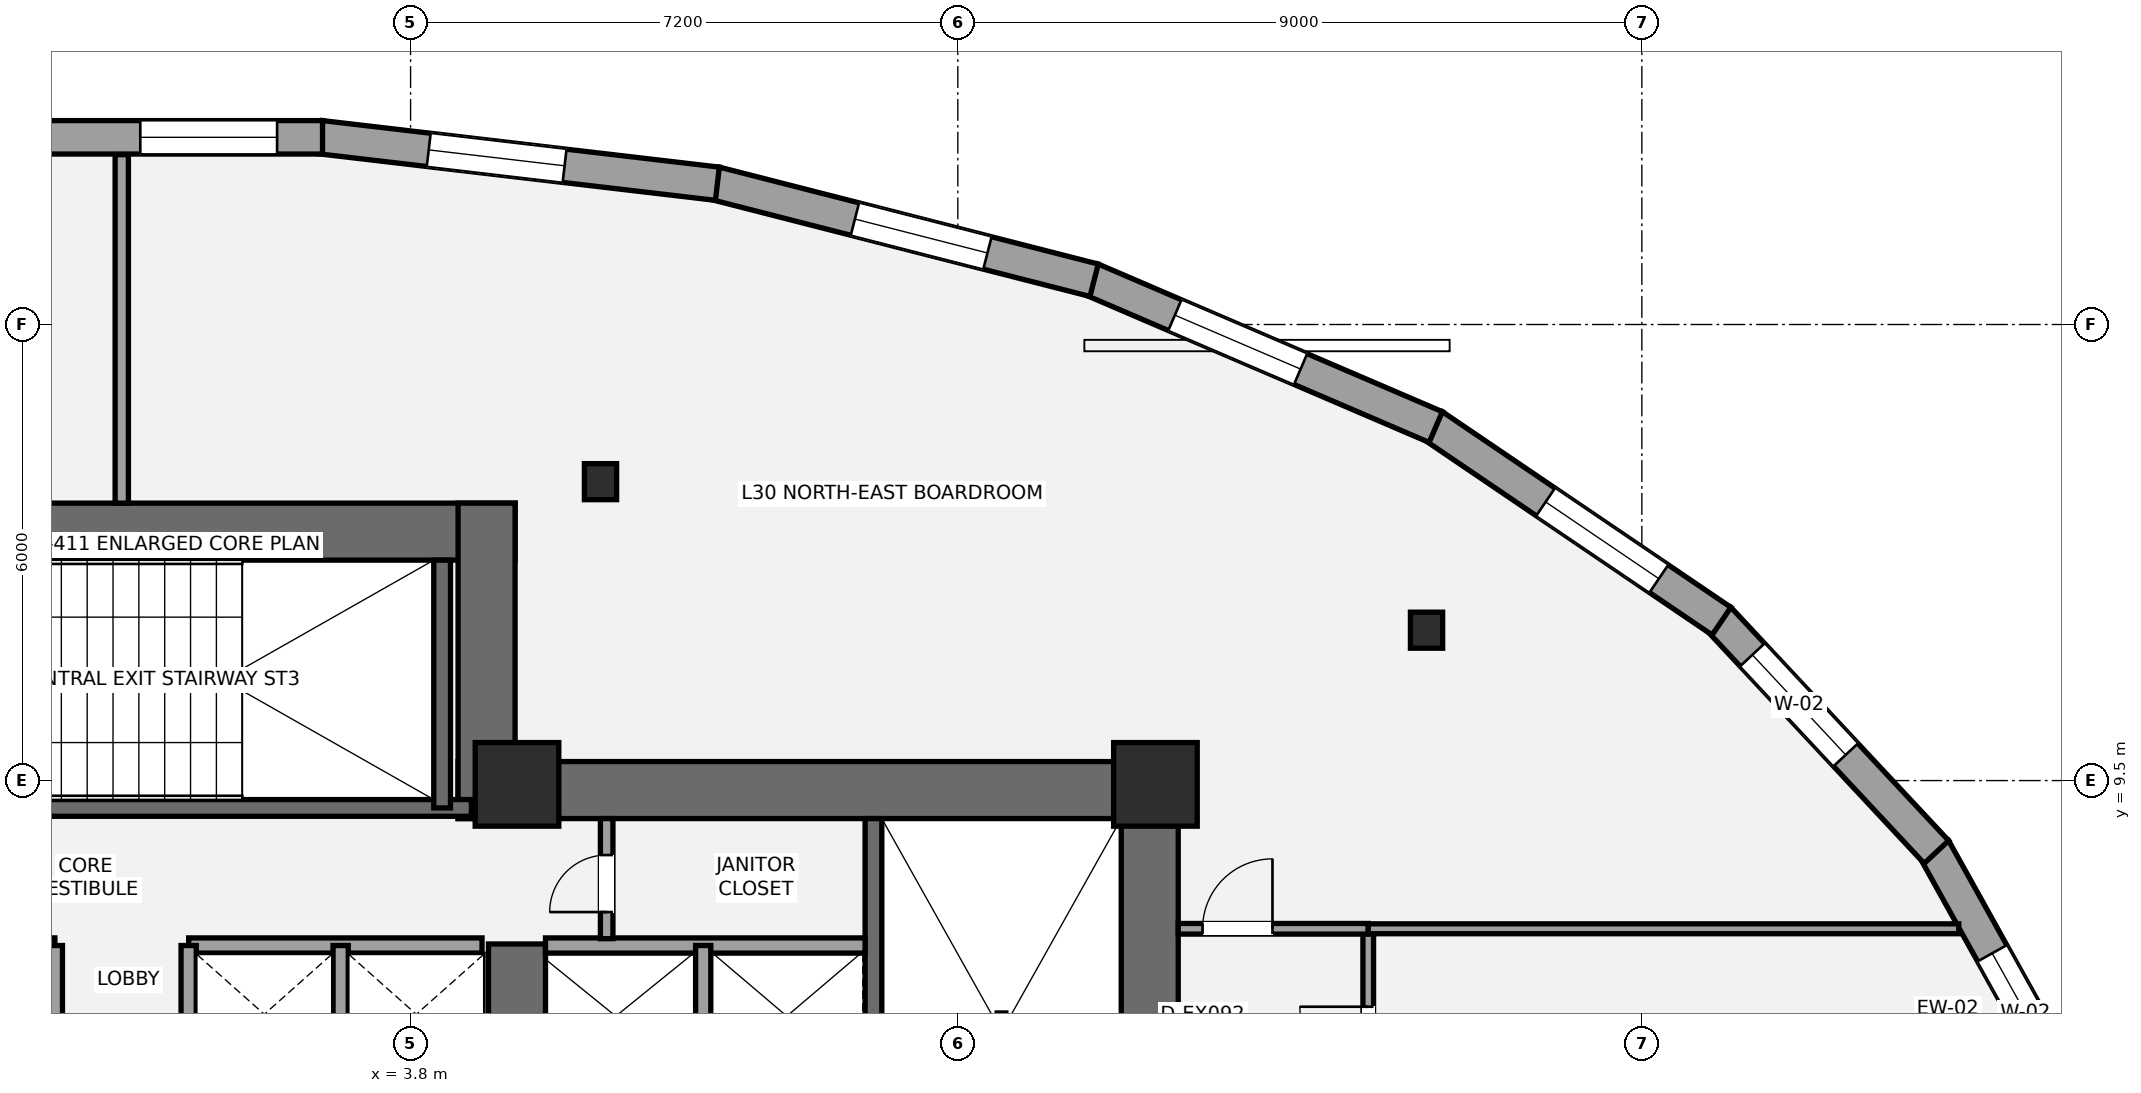
"""IFC4 building model, lengths in metres.
Left out: names, types, materials, properties, quantities, classifications, styles, units other than length and angle.
Written with IfcOpenShell. Run it as: python <this file> out.ifc"""

import sys

from ifc_helpers import new_model, si_unit, direction, frame, frame_2d, origin, origin_2d, place, context, subcontext, project, spatial, rectangle, i_section, extrude, element, fill, save


model = new_model("IFC4")
c1 = context("Model", 3, precision=1e-05, world=origin(), true_north=direction((0.0, 1.0)))
c2 = subcontext(c1, "Body", "Model", "MODEL_VIEW")
j1 = project(units=[si_unit("LENGTHUNIT", "METRE"), si_unit("PLANEANGLEUNIT", "RADIAN")], contexts=[c1])
p1 = place(None, origin())
s1 = spatial("IfcSite", under=j1, at=p1, CompositionType="ELEMENT")
p2 = place(p1, origin())
s2 = spatial("IfcBuilding", under=s1, at=p2, CompositionType="ELEMENT")
p3 = place(p2, frame((0.0, 0.0, 114.1)))
s3 = spatial("IfcBuildingStorey", under=s2, at=p3, CompositionType="ELEMENT", Elevation=114.1)
p4 = place(p3, frame((13.525, 1.1, 0.0), z_axis=(0.0, 0.0, 1.0), x_axis=(0.0, 1.0, 0.0)))
e1 = element("IfcWall", 1, at=p4, inside=s3, PredefinedType="SHEAR", context=c2, shape_type="SweptSolid", body=[
    extrude(rectangle(XDim=8.65, YDim=0.75, at=frame_2d((4.325, 0.0))), origin(), (0.0, 0.0, 1.0), 3.5),
])
p5 = place(p3, frame((4.425, 9.375, 0.0), z_axis=(0.0, 0.0, 1.0), x_axis=(1.0, 0.0, 0.0)))
e2 = element("IfcWall", 2, at=p5, inside=s3, PredefinedType="SHEAR", context=c2, shape_type="SweptSolid", body=[
    extrude(rectangle(XDim=9.475, YDim=0.75, at=frame_2d((4.737, 0.0))), origin(), (0.0, 0.0, 1.0), 3.5),
])
p6 = place(p3, frame((5.2, 5.35, 0.0), z_axis=(0.0, 0.0, 1.0), x_axis=(0.0, 1.0, 0.0)))
e3 = element("IfcWall", 3, at=p6, inside=s3, PredefinedType="SHEAR", context=c2, shape_type="SweptSolid", body=[
    extrude(rectangle(XDim=2.0, YDim=0.75, at=frame_2d((1.0, 0.0))), origin(), (0.0, 0.0, 1.0), 3.5),
])
p7 = place(p3, frame((9.89, 1.85, 0.0), z_axis=(0.0, 0.0, 1.0), x_axis=(0.0, 1.0, 0.0)))
e4 = element("IfcWall", 4, at=p7, inside=s3, PredefinedType="SHEAR", context=c2, shape_type="SweptSolid", body=[
    extrude(rectangle(XDim=7.15, YDim=0.22, at=frame_2d((3.575, 0.0))), origin(), (0.0, 0.0, 1.0), 3.5),
])
p8 = place(p3, frame((-5.175, 12.775, 0.0), z_axis=(0.0, 0.0, 1.0), x_axis=(1.0, 0.0, 0.0)))
e5 = element("IfcWall", 5, at=p8, inside=s3, PredefinedType="SHEAR", context=c2, shape_type="SweptSolid", body=[
    extrude(rectangle(XDim=10.35, YDim=0.75, at=frame_2d((5.175, 0.0))), origin(), (0.0, 0.0, 1.0), 3.5),
])
p9 = place(p3, frame((4.8, 9.0, 0.0), z_axis=(0.0, 0.0, 1.0), x_axis=(0.0, 1.0, 0.0)))
e6 = element("IfcWall", 6, at=p9, inside=s3, PredefinedType="SHEAR", context=c2, shape_type="SweptSolid", body=[
    extrude(rectangle(XDim=4.15, YDim=0.75, at=frame_2d((2.075, 0.0))), origin(), (0.0, 0.0, 1.0), 3.5),
])
p10 = place(p3, frame((-4.7, 9.14, 0.0), z_axis=(0.0, 0.0, 1.0), x_axis=(1.0, 0.0, 0.0)))
e7 = element("IfcWall", 7, at=p10, inside=s3, PredefinedType="SHEAR", context=c2, shape_type="SweptSolid", body=[
    extrude(rectangle(XDim=9.3, YDim=0.22, at=frame_2d((4.65, 0.0))), origin(), (0.0, 0.0, 1.0), 3.5),
])
p11 = place(p10, frame((1.15, 0.0, 0.0)))
e8 = element("IfcOpeningElement", 8, at=p11, cuts=e7, PredefinedType="OPENING", context=c2, shape_type="SweptSolid", body=[
    extrude(rectangle(XDim=1.05, YDim=2.15, at=frame_2d((0.525, 1.075))), frame((0.0, 0.12, 0.0), z_axis=(0.0, -1.0, 0.0), x_axis=(1.0, 0.0, 0.0)), (0.0, 0.0, 1.0), 0.24),
])
p12 = place(p3, frame((4.215, 9.14, 0.0), z_axis=(0.0, 0.0, 1.0), x_axis=(0.0, 1.0, 0.0)))
e9 = element("IfcWall", 9, at=p12, inside=s3, PredefinedType="SHEAR", context=c2, shape_type="SweptSolid", body=[
    extrude(rectangle(XDim=3.26, YDim=0.22, at=frame_2d((1.63, 0.0))), origin(), (0.0, 0.0, 1.0), 3.5),
])
for number, where, z_axis, x_axis in (
    (10, (5.2, 9.45, 0.0), (0.0, 0.0, 1.0), (1.0, 0.0, 0.0)),
    (11, (13.6, 9.45, 0.0), (0.0, 0.0, 1.0), (1.0, 0.0, 0.0)),
):
    element("IfcColumn", number, at=place(p3, frame(where, z_axis=z_axis, x_axis=x_axis)), inside=s3, PredefinedType="COLUMN", context=c2, shape_type="SweptSolid", body=[
        extrude(rectangle(XDim=1.1, YDim=1.1, at=origin_2d()), origin(), (0.0, 0.0, 1.0), 3.5),
    ])
for number, where, z_axis, x_axis in (
    (12, (17.167, 11.478, 0.0), (0.0, 0.0, 1.0), (1.0, 0.0, 0.0)),
    (13, (6.299, 13.433, 0.0), (0.0, 0.0, 1.0), (1.0, 0.0, 0.0)),
):
    element("IfcColumn", number, at=place(p3, frame(where, z_axis=z_axis, x_axis=x_axis)), inside=s3, PredefinedType="COLUMN", context=c2, shape_type="SweptSolid", body=[
        extrude(i_section(OverallWidth=0.424, OverallDepth=0.474, WebThickness=0.048, FlangeThickness=0.077, at=origin_2d()), origin(), (0.0, 0.0, 1.0), 3.5),
    ])
p13 = place(p3, frame((23.844, 8.603, 0.0), z_axis=(0.0, 0.0, 1.0), x_axis=(0.486285838125, -0.873799796086, 0.0)))
e14 = element("IfcWall", 14, at=p13, inside=s3, PredefinedType="STANDARD", context=c2, shape_type="SweptSolid", body=[
    extrude(rectangle(XDim=3.868, YDim=0.44, at=frame_2d((1.934, 0.0))), origin(), (0.0, 0.0, 1.0), 2.528),
])
p14 = place(p13, frame((1.574, 0.0, 0.65)))
e15 = element("IfcOpeningElement", 15, at=p14, cuts=e14, PredefinedType="OPENING", context=c2, shape_type="SweptSolid", body=[
    extrude(rectangle(XDim=1.8, YDim=1.7, at=frame_2d((0.9, 0.85))), frame((0.0, 0.23, 0.0), z_axis=(0.0, -1.0, 0.0), x_axis=(1.0, 0.0, 0.0)), (0.0, 0.0, 1.0), 0.46),
])
p15 = place(p3, frame((21.01, 11.629, 0.0), z_axis=(0.0, 0.0, 1.0), x_axis=(0.682353469166, -0.73102239577, 0.0)))
e16 = element("IfcWall", 16, at=p15, inside=s3, PredefinedType="STANDARD", context=c2, shape_type="SweptSolid", body=[
    extrude(rectangle(XDim=4.199, YDim=0.44, at=frame_2d((2.099, 0.0))), origin(), (0.0, 0.0, 1.0), 2.528),
])
p16 = place(p15, frame((0.65, 0.0, 0.65)))
e17 = element("IfcOpeningElement", 17, at=p16, cuts=e16, PredefinedType="OPENING", context=c2, shape_type="SweptSolid", body=[
    extrude(rectangle(XDim=1.8, YDim=1.7, at=frame_2d((0.9, 0.85))), frame((0.0, 0.23, 0.0), z_axis=(0.0, -1.0, 0.0), x_axis=(1.0, 0.0, 0.0)), (0.0, 0.0, 1.0), 0.46),
])
p17 = place(p3, frame((17.251, 14.171, 0.0), z_axis=(0.0, 0.0, 1.0), x_axis=(0.827717717125, -0.561144705719, 0.0)))
e18 = element("IfcWall", 18, at=p17, inside=s3, PredefinedType="STANDARD", context=c2, shape_type="SweptSolid", body=[
    extrude(rectangle(XDim=4.587, YDim=0.44, at=frame_2d((2.293, 0.0))), origin(), (0.0, 0.0, 1.0), 2.528),
])
p18 = place(p17, frame((1.791, 0.0, 0.65)))
e19 = element("IfcOpeningElement", 19, at=p18, cuts=e18, PredefinedType="OPENING", context=c2, shape_type="SweptSolid", body=[
    extrude(rectangle(XDim=1.8, YDim=1.7, at=frame_2d((0.9, 0.85))), frame((0.0, 0.23, 0.0), z_axis=(0.0, -1.0, 0.0), x_axis=(1.0, 0.0, 0.0)), (0.0, 0.0, 1.0), 0.46),
])
p19 = place(p3, frame((12.761, 16.093, 0.0), z_axis=(0.0, 0.0, 1.0), x_axis=(0.919001414266, -0.39425423343, 0.0)))
e20 = element("IfcWall", 20, at=p19, inside=s3, PredefinedType="STANDARD", context=c2, shape_type="SweptSolid", body=[
    extrude(rectangle(XDim=4.926, YDim=0.44, at=frame_2d((2.463, 0.0))), origin(), (0.0, 0.0, 1.0), 2.528),
])
p20 = place(p19, frame((1.191, 0.0, 0.65)))
e21 = element("IfcOpeningElement", 21, at=p20, cuts=e20, PredefinedType="OPENING", context=c2, shape_type="SweptSolid", body=[
    extrude(rectangle(XDim=1.8, YDim=1.7, at=frame_2d((0.9, 0.85))), frame((0.0, 0.23, 0.0), z_axis=(0.0, -1.0, 0.0), x_axis=(1.0, 0.0, 0.0)), (0.0, 0.0, 1.0), 0.46),
])
p21 = place(p3, frame((7.808, 17.358, 0.0), z_axis=(0.0, 0.0, 1.0), x_axis=(0.968802439575, -0.247834285507, 0.0)))
e22 = element("IfcWall", 22, at=p21, inside=s3, PredefinedType="STANDARD", context=c2, shape_type="SweptSolid", body=[
    extrude(rectangle(XDim=5.146, YDim=0.44, at=frame_2d((2.573, 0.0))), origin(), (0.0, 0.0, 1.0), 2.528),
])
p22 = place(p21, frame((1.898, 0.0, 0.65)))
e23 = element("IfcOpeningElement", 23, at=p22, cuts=e22, PredefinedType="OPENING", context=c2, shape_type="SweptSolid", body=[
    extrude(rectangle(XDim=1.8, YDim=1.7, at=frame_2d((0.9, 0.85))), frame((0.0, 0.23, 0.0), z_axis=(0.0, -1.0, 0.0), x_axis=(1.0, 0.0, 0.0)), (0.0, 0.0, 1.0), 0.46),
])
p23 = place(p3, frame((2.616, 17.964, 0.0), z_axis=(0.0, 0.0, 1.0), x_axis=(0.993202502633, -0.116399264444, 0.0)))
e24 = element("IfcWall", 24, at=p23, inside=s3, PredefinedType="STANDARD", context=c2, shape_type="SweptSolid", body=[
    extrude(rectangle(XDim=5.256, YDim=0.44, at=frame_2d((2.628, 0.0))), origin(), (0.0, 0.0, 1.0), 2.528),
])
p24 = place(p23, frame((1.432, 0.0, 0.65)))
e25 = element("IfcOpeningElement", 25, at=p24, cuts=e24, PredefinedType="OPENING", context=c2, shape_type="SweptSolid", body=[
    extrude(rectangle(XDim=1.8, YDim=1.7, at=frame_2d((0.9, 0.85))), frame((0.0, 0.23, 0.0), z_axis=(0.0, -1.0, 0.0), x_axis=(1.0, 0.0, 0.0)), (0.0, 0.0, 1.0), 0.46),
])
p25 = place(p3, frame((-2.642, 17.963, 0.0), z_axis=(0.0, 0.0, 1.0), x_axis=(1.0, 0.0, 0.0)))
e26 = element("IfcWall", 26, at=p25, inside=s3, PredefinedType="STANDARD", context=c2, shape_type="SweptSolid", body=[
    extrude(rectangle(XDim=5.283, YDim=0.44, at=frame_2d((2.642, 0.0))), origin(), (0.0, 0.0, 1.0), 2.528),
])
p26 = place(p25, frame((2.885, 0.0, 0.65)))
e27 = element("IfcOpeningElement", 27, at=p26, cuts=e26, PredefinedType="OPENING", context=c2, shape_type="SweptSolid", body=[
    extrude(rectangle(XDim=1.8, YDim=1.7, at=frame_2d((0.9, 0.85))), frame((0.0, 0.23, 0.0), z_axis=(0.0, -1.0, 0.0), x_axis=(1.0, 0.0, 0.0)), (0.0, 0.0, 1.0), 0.46),
])
p27 = place(p3, frame((5.575, 7.33, 0.0), z_axis=(0.0, 0.0, 1.0), x_axis=(1.0, 0.0, 0.0)))
e28 = element("IfcWall", 28, at=p27, inside=s3, PredefinedType="SOLIDWALL", context=c2, shape_type="SweptSolid", body=[
    extrude(rectangle(XDim=4.205, YDim=0.2, at=frame_2d((2.103, 0.0))), origin(), (0.0, 0.0, 1.0), 3.31),
])
p28 = place(p3, frame((7.65, 5.47, 0.0), z_axis=(0.0, 0.0, 1.0), x_axis=(0.0, 1.0, 0.0)))
e29 = element("IfcWall", 29, at=p28, inside=s3, PredefinedType="SOLIDWALL", context=c2, shape_type="SweptSolid", body=[
    extrude(rectangle(XDim=1.86, YDim=0.2, at=frame_2d((0.93, 0.0))), origin(), (0.0, 0.0, 1.0), 3.31),
])
for number, where, z_axis, x_axis in (
    (30, (-4.74, 7.33, 0.0), (0.0, 0.0, 1.0), (1.0, 0.0, 0.0)),
    (31, (0.88, 7.33, 0.0), (0.0, 0.0, 1.0), (1.0, 0.0, 0.0)),
):
    element("IfcWall", number, at=place(p3, frame(where, z_axis=z_axis, x_axis=x_axis)), inside=s3, PredefinedType="SOLIDWALL", context=c2, shape_type="SweptSolid", body=[
        extrude(rectangle(XDim=3.86, YDim=0.2, at=frame_2d((1.93, 0.0))), origin(), (0.0, 0.0, 1.0), 3.31),
    ])
for number, where, z_axis, x_axis in (
    (32, (2.88, 5.52, 0.0), (0.0, 0.0, 1.0), (0.0, 1.0, 0.0)),
    (33, (-0.88, 5.52, 0.0), (0.0, 0.0, 1.0), (0.0, 1.0, 0.0)),
    (34, (0.88, 5.52, 0.0), (0.0, 0.0, 1.0), (0.0, 1.0, 0.0)),
):
    element("IfcWall", number, at=place(p3, frame(where, z_axis=z_axis, x_axis=x_axis)), inside=s3, PredefinedType="SOLIDWALL", context=c2, shape_type="SweptSolid", body=[
        extrude(rectangle(XDim=1.81, YDim=0.2, at=frame_2d((0.905, 0.0))), origin(), (0.0, 0.0, 1.0), 3.31),
    ])
p29 = place(p3, frame((6.38, 7.42, 0.0), z_axis=(0.0, 0.0, 1.0), x_axis=(0.0, 1.0, 0.0)))
e35 = element("IfcWall", 35, at=p29, inside=s3, PredefinedType="PARTITIONING", context=c2, shape_type="SweptSolid", body=[
    extrude(rectangle(XDim=1.58, YDim=0.165, at=frame_2d((0.79, 0.0))), origin(), (0.0, 0.0, 1.0), 3.31),
])
p30 = place(p29, frame((0.35, 0.0, 0.0)))
e36 = element("IfcOpeningElement", 36, at=p30, cuts=e35, PredefinedType="OPENING", context=c2, shape_type="SweptSolid", body=[
    extrude(rectangle(XDim=0.75, YDim=2.1, at=frame_2d((0.375, 1.05))), frame((0.0, 0.093, 0.0), z_axis=(0.0, -1.0, 0.0), x_axis=(1.0, 0.0, 0.0)), (0.0, 0.0, 1.0), 0.185),
])
p31 = place(p3, frame((16.4, -14.284, 0.0), z_axis=(0.0, 0.0, 1.0), x_axis=(0.0, 1.0, 0.0)))
e37 = element("IfcWall", 37, at=p31, inside=s3, PredefinedType="PARTITIONING", context=c2, shape_type="SweptSolid", body=[
    extrude(rectangle(XDim=21.834, YDim=0.14, at=frame_2d((10.917, 0.0))), origin(), (0.0, 0.0, 1.0), 2.763),
])
p32 = place(p31, frame((11.383, 0.0, 0.0)))
e38 = element("IfcOpeningElement", 38, at=p32, cuts=e37, PredefinedType="OPENING", context=c2, shape_type="SweptSolid", body=[
    extrude(rectangle(XDim=0.9, YDim=2.1, at=frame_2d((0.45, 1.05))), frame((0.0, 0.08, 0.0), z_axis=(0.0, -1.0, 0.0), x_axis=(1.0, 0.0, 0.0)), (0.0, 0.0, 1.0), 0.16),
])
p33 = place(p31, frame((16.533, 0.0, 0.0)))
e39 = element("IfcOpeningElement", 39, at=p33, cuts=e37, PredefinedType="OPENING", context=c2, shape_type="SweptSolid", body=[
    extrude(rectangle(XDim=0.9, YDim=2.1, at=frame_2d((0.45, 1.05))), frame((0.0, 0.08, 0.0), z_axis=(0.0, -1.0, 0.0), x_axis=(1.0, 0.0, 0.0)), (0.0, 0.0, 1.0), 0.16),
])
p34 = place(p31, frame((19.908, 0.0, 0.0)))
e40 = element("IfcOpeningElement", 40, at=p34, cuts=e37, PredefinedType="OPENING", context=c2, shape_type="SweptSolid", body=[
    extrude(rectangle(XDim=0.9, YDim=2.1, at=frame_2d((0.45, 1.05))), frame((0.0, 0.08, 0.0), z_axis=(0.0, -1.0, 0.0), x_axis=(1.0, 0.0, 0.0)), (0.0, 0.0, 1.0), 0.16),
])
p35 = place(p3, frame((13.9, 7.55, 0.0), z_axis=(0.0, 0.0, 1.0), x_axis=(1.0, 0.0, 0.0)))
e41 = element("IfcWall", 41, at=p35, inside=s3, PredefinedType="PARTITIONING", context=c2, shape_type="SweptSolid", body=[
    extrude(rectangle(XDim=2.5, YDim=0.14, at=frame_2d((1.25, 0.0))), origin(), (0.0, 0.0, 1.0), 2.763),
])
p36 = place(p35, frame((0.32, 0.0, 0.0)))
e42 = element("IfcOpeningElement", 42, at=p36, cuts=e41, PredefinedType="OPENING", context=c2, shape_type="SweptSolid", body=[
    extrude(rectangle(XDim=0.92, YDim=2.15, at=frame_2d((0.46, 1.075))), frame((0.0, 0.08, 0.0), z_axis=(0.0, -1.0, 0.0), x_axis=(1.0, 0.0, 0.0)), (0.0, 0.0, 1.0), 0.16),
])
p37 = place(p3, frame((0.0, 13.15, 0.0), z_axis=(0.0, 0.0, 1.0), x_axis=(0.0, 1.0, 0.0)))
e43 = element("IfcWall", 43, at=p37, inside=s3, PredefinedType="PARTITIONING", context=c2, shape_type="SweptSolid", body=[
    extrude(rectangle(XDim=4.585, YDim=0.175, at=frame_2d((2.292, 0.0))), origin(), (0.0, 0.0, 1.0), 3.31),
])
p38 = place(p3, frame((16.4, 7.55, 0.0), z_axis=(0.0, 0.0, 1.0), x_axis=(1.0, 0.0, 0.0)))
e44 = element("IfcWall", 44, at=p38, inside=s3, PredefinedType="PARTITIONING", context=c2, shape_type="SweptSolid", body=[
    extrude(rectangle(XDim=7.769, YDim=0.13, at=frame_2d((3.885, 0.0))), origin(), (0.0, 0.0, 1.0), 2.763),
])
p39 = place(p14, origin())
e45 = element("IfcWindow", 45, at=p39, inside=s3, PartitioningType="SINGLE_PANEL", PredefinedType="WINDOW", context=c2, shape_type="SweptSolid", body=[
    extrude(rectangle(XDim=1.8, YDim=1.7, at=frame_2d((0.9, 0.85))), frame((0.0, -0.01, 0.0), z_axis=(0.0, -1.0, 0.0), x_axis=(1.0, 0.0, 0.0)), (0.0, 0.0, 1.0), 0.06),
])
fill(e15, e45)
p40 = place(p16, origin())
e46 = element("IfcWindow", 46, at=p40, inside=s3, PartitioningType="SINGLE_PANEL", PredefinedType="WINDOW", context=c2, shape_type="SweptSolid", body=[
    extrude(rectangle(XDim=1.8, YDim=1.7, at=frame_2d((0.9, 0.85))), frame((0.0, -0.01, 0.0), z_axis=(0.0, -1.0, 0.0), x_axis=(1.0, 0.0, 0.0)), (0.0, 0.0, 1.0), 0.06),
])
fill(e17, e46)
p41 = place(p18, origin())
e47 = element("IfcWindow", 47, at=p41, inside=s3, PartitioningType="SINGLE_PANEL", PredefinedType="WINDOW", context=c2, shape_type="SweptSolid", body=[
    extrude(rectangle(XDim=1.8, YDim=1.7, at=frame_2d((0.9, 0.85))), frame((0.0, -0.01, 0.0), z_axis=(0.0, -1.0, 0.0), x_axis=(1.0, 0.0, 0.0)), (0.0, 0.0, 1.0), 0.06),
])
fill(e19, e47)
p42 = place(p20, origin())
e48 = element("IfcWindow", 48, at=p42, inside=s3, PartitioningType="SINGLE_PANEL", PredefinedType="WINDOW", context=c2, shape_type="SweptSolid", body=[
    extrude(rectangle(XDim=1.8, YDim=1.7, at=frame_2d((0.9, 0.85))), frame((0.0, -0.01, 0.0), z_axis=(0.0, -1.0, 0.0), x_axis=(1.0, 0.0, 0.0)), (0.0, 0.0, 1.0), 0.06),
])
fill(e21, e48)
p43 = place(p22, origin())
e49 = element("IfcWindow", 49, at=p43, inside=s3, PartitioningType="SINGLE_PANEL", PredefinedType="WINDOW", context=c2, shape_type="SweptSolid", body=[
    extrude(rectangle(XDim=1.8, YDim=1.7, at=frame_2d((0.9, 0.85))), frame((0.0, -0.01, 0.0), z_axis=(0.0, -1.0, 0.0), x_axis=(1.0, 0.0, 0.0)), (0.0, 0.0, 1.0), 0.06),
])
fill(e23, e49)
p44 = place(p24, origin())
e50 = element("IfcWindow", 50, at=p44, inside=s3, PartitioningType="SINGLE_PANEL", PredefinedType="WINDOW", context=c2, shape_type="SweptSolid", body=[
    extrude(rectangle(XDim=1.8, YDim=1.7, at=frame_2d((0.9, 0.85))), frame((0.0, -0.01, 0.0), z_axis=(0.0, -1.0, 0.0), x_axis=(1.0, 0.0, 0.0)), (0.0, 0.0, 1.0), 0.06),
])
fill(e25, e50)
p45 = place(p26, origin())
e51 = element("IfcWindow", 51, at=p45, inside=s3, PartitioningType="SINGLE_PANEL", PredefinedType="WINDOW", context=c2, shape_type="SweptSolid", body=[
    extrude(rectangle(XDim=1.8, YDim=1.7, at=frame_2d((0.9, 0.85))), frame((0.0, -0.01, 0.0), z_axis=(0.0, -1.0, 0.0), x_axis=(1.0, 0.0, 0.0)), (0.0, 0.0, 1.0), 0.06),
])
fill(e27, e51)
p46 = place(p30, origin())
e52 = element("IfcDoor", 52, at=p46, inside=s3, OperationType="SINGLE_SWING_LEFT", PredefinedType="DOOR", context=c2, shape_type="SweptSolid", body=[
    extrude(rectangle(XDim=0.75, YDim=2.1, at=frame_2d((0.375, 1.05))), frame((0.0, 0.025, 0.0), z_axis=(0.0, -1.0, 0.0), x_axis=(1.0, 0.0, 0.0)), (0.0, 0.0, 1.0), 0.05),
])
fill(e36, e52)
p47 = place(p36, origin())
e53 = element("IfcDoor", 53, at=p47, inside=s3, OperationType="SINGLE_SWING_RIGHT", PredefinedType="DOOR", context=c2, shape_type="SweptSolid", body=[
    extrude(rectangle(XDim=0.92, YDim=2.15, at=frame_2d((0.46, 1.075))), frame((0.0, 0.025, 0.0), z_axis=(0.0, -1.0, 0.0), x_axis=(1.0, 0.0, 0.0)), (0.0, 0.0, 1.0), 0.05),
])
fill(e42, e53)
p48 = place(p34, origin())
e54 = element("IfcDoor", 54, at=p48, inside=s3, OperationType="SINGLE_SWING_RIGHT", PredefinedType="DOOR", context=c2, shape_type="SweptSolid", body=[
    extrude(rectangle(XDim=0.9, YDim=2.1, at=frame_2d((0.45, 1.05))), frame((0.0, 0.025, 0.0), z_axis=(0.0, -1.0, 0.0), x_axis=(1.0, 0.0, 0.0)), (0.0, 0.0, 1.0), 0.05),
])
fill(e40, e54)
save(model, sys.argv[1])
